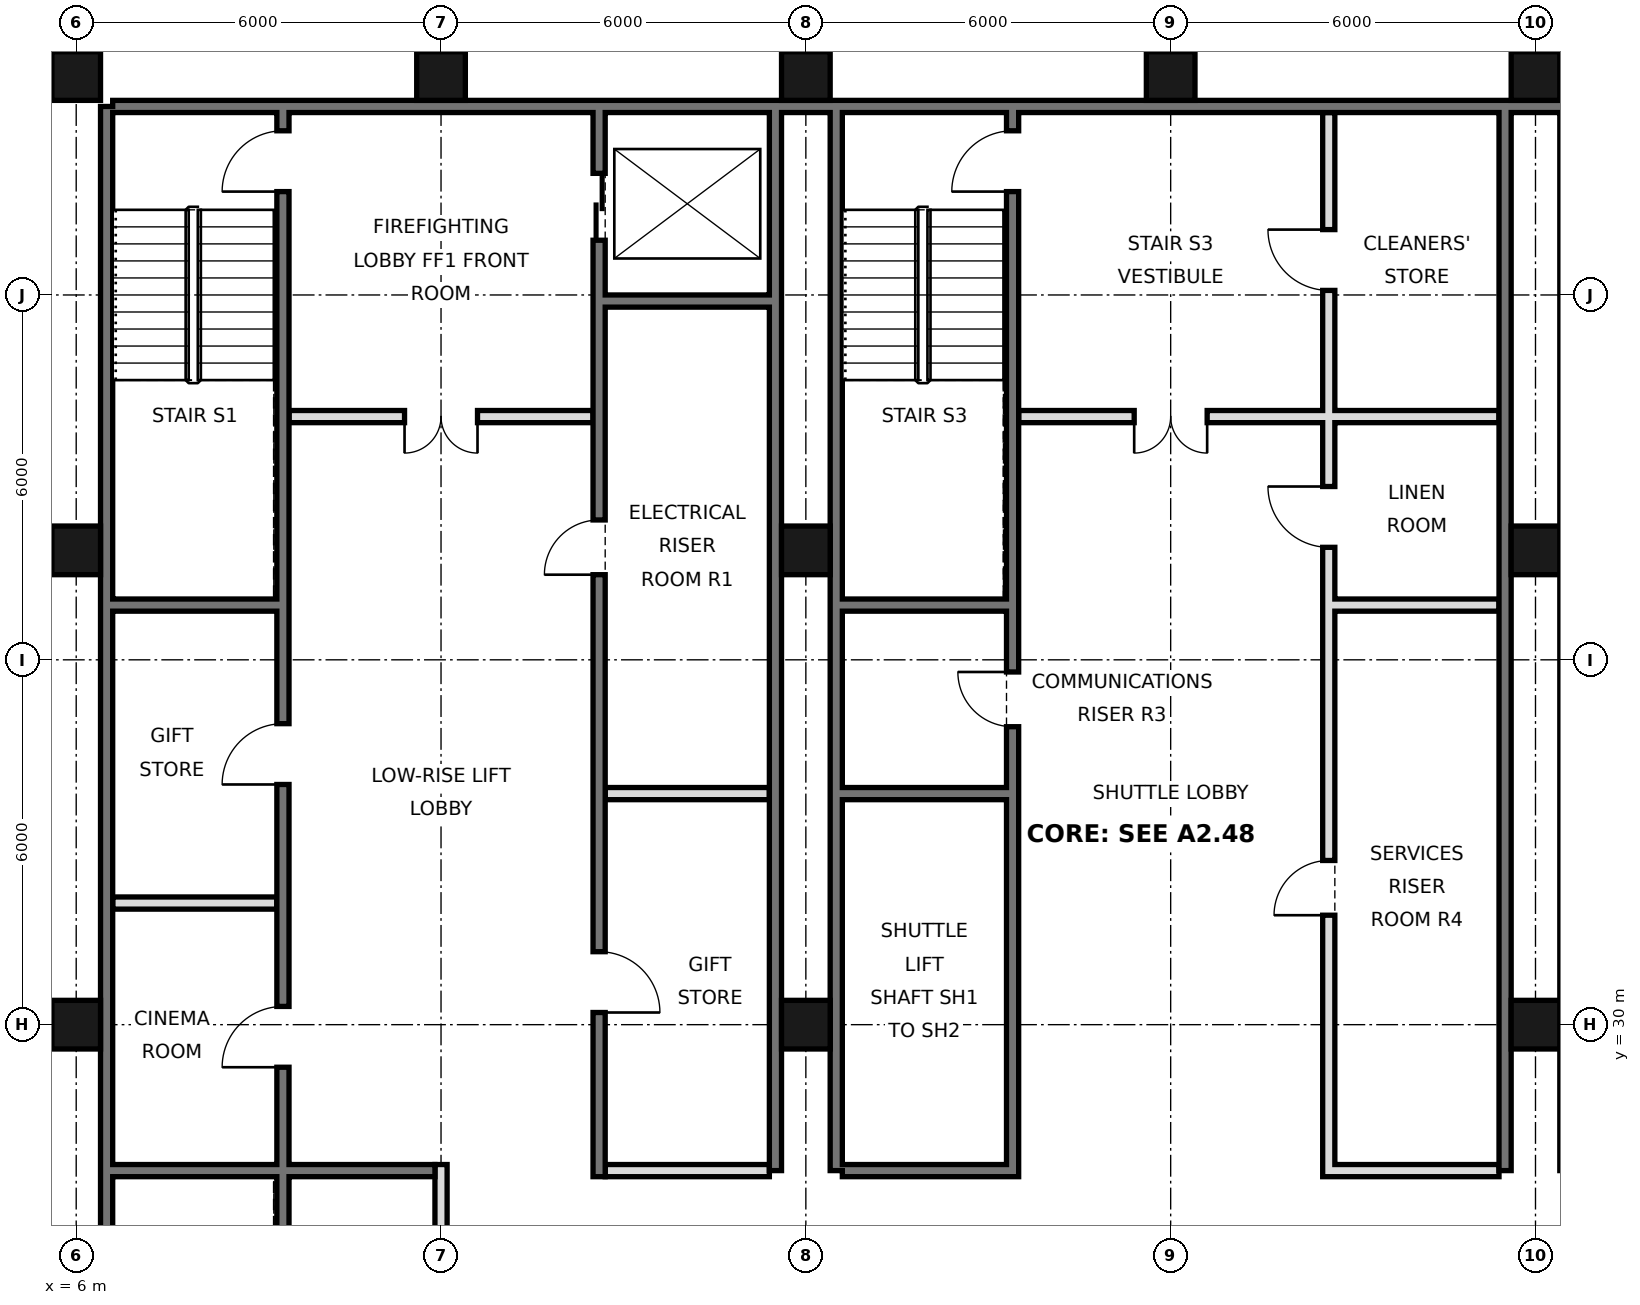
"""IFC4 building model, lengths in metres.
Left out: names, types, materials, properties, quantities, classifications, styles, units other than length and angle.
Written with IfcOpenShell. Run it as: python <this file> out.ifc"""

import sys

from ifc_helpers import new_model, si_unit, direction, frame, frame_2d, origin, origin_2d, place, context, subcontext, project, spatial, rectangle, hollow_rectangle, extrude, element, fill, save


model = new_model("IFC4")
c1 = context("Model", 3, precision=1e-05, world=origin(), true_north=direction((0.0, 1.0)))
c2 = subcontext(c1, "Body", "Model", "MODEL_VIEW")
j1 = project(units=[si_unit("LENGTHUNIT", "METRE"), si_unit("PLANEANGLEUNIT", "RADIAN")], contexts=[c1])
p1 = place(None, origin())
s1 = spatial("IfcSite", under=j1, at=p1, CompositionType="ELEMENT")
p2 = place(p1, origin())
s2 = spatial("IfcBuilding", under=s1, at=p2, CompositionType="ELEMENT")
p3 = place(p2, frame((0.0, 0.0, 192.0)))
s3 = spatial("IfcBuildingStorey", under=s2, at=p3, CompositionType="ELEMENT", Elevation=192.0)
for number, where, z_axis, x_axis in (
    (1, (6.0, 30.0, 0.0), (0.0, 0.0, 1.0), (1.0, 0.0, 0.0)),
    (2, (6.0, 37.8, 0.0), (0.0, 0.0, 1.0), (1.0, 0.0, 0.0)),
    (3, (6.0, 45.6, 0.0), (0.0, 0.0, 1.0), (1.0, 0.0, 0.0)),
    (4, (12.0, 45.6, 0.0), (0.0, 0.0, 1.0), (1.0, 0.0, 0.0)),
    (5, (18.0, 30.0, 0.0), (0.0, 0.0, 1.0), (1.0, 0.0, 0.0)),
    (6, (18.0, 37.8, 0.0), (0.0, 0.0, 1.0), (1.0, 0.0, 0.0)),
    (7, (18.0, 45.6, 0.0), (0.0, 0.0, 1.0), (1.0, 0.0, 0.0)),
    (8, (24.0, 45.6, 0.0), (0.0, 0.0, 1.0), (1.0, 0.0, 0.0)),
    (9, (30.0, 30.0, 0.0), (0.0, 0.0, 1.0), (1.0, 0.0, 0.0)),
    (10, (30.0, 37.8, 0.0), (0.0, 0.0, 1.0), (1.0, 0.0, 0.0)),
    (11, (30.0, 45.6, 0.0), (0.0, 0.0, 1.0), (1.0, 0.0, 0.0)),
):
    element("IfcColumn", number, at=place(p3, frame(where, z_axis=z_axis, x_axis=x_axis)), inside=s3, PredefinedType="COLUMN", context=c2, shape_type="SweptSolid", body=[
        extrude(hollow_rectangle(XDim=0.8, YDim=0.8, WallThickness=0.045, at=origin_2d()), origin(), (0.0, 0.0, 1.0), 3.6),
    ])
p4 = place(p3, frame((6.5, 21.6, 0.0), z_axis=(0.0, 0.0, 1.0), x_axis=(0.0, 1.0, 0.0)))
e12 = element("IfcWall", 12, at=p4, inside=s3, PredefinedType="SOLIDWALL", context=c2, shape_type="SweptSolid", body=[
    extrude(rectangle(XDim=23.5, YDim=0.2, at=frame_2d((11.75, 0.0))), origin(), (0.0, 0.0, 1.0), 3.42),
])
p5 = place(p3, frame((6.6, 45.1, 0.0), z_axis=(0.0, 0.0, 1.0), x_axis=(1.0, 0.0, 0.0)))
e13 = element("IfcWall", 13, at=p5, inside=s3, PredefinedType="SOLIDWALL", context=c2, shape_type="SweptSolid", body=[
    extrude(rectangle(XDim=34.8, YDim=0.2, at=frame_2d((17.4, 0.0))), origin(), (0.0, 0.0, 1.0), 3.42),
])
for number, where, z_axis, x_axis in (
    (14, (17.5, 27.6, 0.0), (0.0, 0.0, 1.0), (0.0, 1.0, 0.0)),
    (15, (18.5, 27.6, 0.0), (0.0, 0.0, 1.0), (0.0, 1.0, 0.0)),
    (16, (29.5, 27.6, 0.0), (0.0, 0.0, 1.0), (0.0, 1.0, 0.0)),
):
    element("IfcWall", number, at=place(p3, frame(where, z_axis=z_axis, x_axis=x_axis)), inside=s3, PredefinedType="SOLIDWALL", context=c2, shape_type="SweptSolid", body=[
        extrude(rectangle(XDim=17.5, YDim=0.2, at=frame_2d((8.75, 0.0))), origin(), (0.0, 0.0, 1.0), 3.42),
    ])
p6 = place(p3, frame((12.0, 21.6, 0.0), z_axis=(0.0, 0.0, 1.0), x_axis=(0.0, 1.0, 0.0)))
e17 = element("IfcWall", 17, at=p6, inside=s3, PredefinedType="PARTITIONING", context=c2, shape_type="SweptSolid", body=[
    extrude(rectangle(XDim=6.1, YDim=0.2, at=frame_2d((3.05, 0.0))), origin(), (0.0, 0.0, 1.0), 3.42),
])
p7 = place(p3, frame((14.6, 27.5, 0.0), z_axis=(0.0, 0.0, 1.0), x_axis=(0.0, 1.0, 0.0)))
e18 = element("IfcWall", 18, at=p7, inside=s3, PredefinedType="SOLIDWALL", context=c2, shape_type="SweptSolid", body=[
    extrude(rectangle(XDim=17.5, YDim=0.2, at=frame_2d((8.75, 0.0))), origin(), (0.0, 0.0, 1.0), 3.42),
])
p8 = place(p7, frame((15.4, 0.0, 0.0)))
e19 = element("IfcOpeningElement", 19, at=p8, cuts=e18, PredefinedType="OPENING", context=c2, shape_type="SweptSolid", body=[
    extrude(rectangle(XDim=1.1, YDim=2.1, at=frame_2d((0.55, 1.05))), frame((0.0, 0.11, 0.0), z_axis=(0.0, -1.0, 0.0), x_axis=(1.0, 0.0, 0.0)), (0.0, 0.0, 1.0), 0.22),
])
p9 = place(p7, frame((2.7, 0.0, 0.0)))
e20 = element("IfcOpeningElement", 20, at=p9, cuts=e18, PredefinedType="OPENING", context=c2, shape_type="SweptSolid", body=[
    extrude(rectangle(XDim=1.0, YDim=2.1, at=frame_2d((0.5, 1.05))), frame((0.0, 0.11, 0.0), z_axis=(0.0, -1.0, 0.0), x_axis=(1.0, 0.0, 0.0)), (0.0, 0.0, 1.0), 0.22),
])
p10 = place(p7, frame((9.9, 0.0, 0.0)))
e21 = element("IfcOpeningElement", 21, at=p10, cuts=e18, PredefinedType="OPENING", context=c2, shape_type="SweptSolid", body=[
    extrude(rectangle(XDim=0.9, YDim=2.1, at=frame_2d((0.45, 1.05))), frame((0.0, 0.11, 0.0), z_axis=(0.0, -1.0, 0.0), x_axis=(1.0, 0.0, 0.0)), (0.0, 0.0, 1.0), 0.22),
])
p11 = place(p3, frame((21.4, 27.5, 0.0), z_axis=(0.0, 0.0, 1.0), x_axis=(0.0, 1.0, 0.0)))
e22 = element("IfcWall", 22, at=p11, inside=s3, PredefinedType="SOLIDWALL", context=c2, shape_type="SweptSolid", body=[
    extrude(rectangle(XDim=17.5, YDim=0.2, at=frame_2d((8.75, 0.0))), origin(), (0.0, 0.0, 1.0), 3.42),
])
p12 = place(p11, frame((16.2, 0.0, 0.0)))
e23 = element("IfcOpeningElement", 23, at=p12, cuts=e22, PredefinedType="OPENING", context=c2, shape_type="SweptSolid", body=[
    extrude(rectangle(XDim=1.0, YDim=2.1, at=frame_2d((0.5, 1.05))), frame((0.0, 0.11, 0.0), z_axis=(0.0, -1.0, 0.0), x_axis=(1.0, 0.0, 0.0)), (0.0, 0.0, 1.0), 0.22),
])
p13 = place(p11, frame((7.4, 0.0, 0.0)))
e24 = element("IfcOpeningElement", 24, at=p13, cuts=e22, PredefinedType="OPENING", context=c2, shape_type="SweptSolid", body=[
    extrude(rectangle(XDim=0.9, YDim=2.1, at=frame_2d((0.45, 1.05))), frame((0.0, 0.11, 0.0), z_axis=(0.0, -1.0, 0.0), x_axis=(1.0, 0.0, 0.0)), (0.0, 0.0, 1.0), 0.22),
])
p14 = place(p3, frame((26.6, 27.5, 0.0), z_axis=(0.0, 0.0, 1.0), x_axis=(0.0, 1.0, 0.0)))
e25 = element("IfcWall", 25, at=p14, inside=s3, PredefinedType="SOLIDWALL", context=c2, shape_type="SweptSolid", body=[
    extrude(rectangle(XDim=17.5, YDim=0.2, at=frame_2d((8.75, 0.0))), origin(), (0.0, 0.0, 1.0), 3.42),
])
p15 = place(p14, frame((4.3, 0.0, 0.0)))
e26 = element("IfcOpeningElement", 26, at=p15, cuts=e25, PredefinedType="OPENING", context=c2, shape_type="SweptSolid", body=[
    extrude(rectangle(XDim=0.9, YDim=2.1, at=frame_2d((0.45, 1.05))), frame((0.0, 0.11, 0.0), z_axis=(0.0, -1.0, 0.0), x_axis=(1.0, 0.0, 0.0)), (0.0, 0.0, 1.0), 0.22),
])
p16 = place(p14, frame((10.35, 0.0, 0.0)))
e27 = element("IfcOpeningElement", 27, at=p16, cuts=e25, PredefinedType="OPENING", context=c2, shape_type="SweptSolid", body=[
    extrude(rectangle(XDim=1.0, YDim=2.1, at=frame_2d((0.5, 1.05))), frame((0.0, 0.11, 0.0), z_axis=(0.0, -1.0, 0.0), x_axis=(1.0, 0.0, 0.0)), (0.0, 0.0, 1.0), 0.22),
])
p17 = place(p14, frame((14.575, 0.0, 0.0)))
e28 = element("IfcOpeningElement", 28, at=p17, cuts=e25, PredefinedType="OPENING", context=c2, shape_type="SweptSolid", body=[
    extrude(rectangle(XDim=1.0, YDim=2.1, at=frame_2d((0.5, 1.05))), frame((0.0, 0.11, 0.0), z_axis=(0.0, -1.0, 0.0), x_axis=(1.0, 0.0, 0.0)), (0.0, 0.0, 1.0), 0.22),
])
p18 = place(p3, frame((9.4, 21.6, 0.0), z_axis=(0.0, 0.0, 1.0), x_axis=(0.0, 1.0, 0.0)))
e29 = element("IfcWall", 29, at=p18, inside=s3, PredefinedType="SOLIDWALL", context=c2, shape_type="SweptSolid", body=[
    extrude(rectangle(XDim=23.4, YDim=0.2, at=frame_2d((11.7, 0.0))), origin(), (0.0, 0.0, 1.0), 3.42),
])
p19 = place(p18, frame((7.7, 0.0, 0.0)))
e30 = element("IfcOpeningElement", 30, at=p19, cuts=e29, PredefinedType="OPENING", context=c2, shape_type="SweptSolid", body=[
    extrude(rectangle(XDim=1.0, YDim=2.1, at=frame_2d((0.5, 1.05))), frame((0.0, 0.11, 0.0), z_axis=(0.0, -1.0, 0.0), x_axis=(1.0, 0.0, 0.0)), (0.0, 0.0, 1.0), 0.22),
])
p20 = place(p18, frame((12.35, 0.0, 0.0)))
e31 = element("IfcOpeningElement", 31, at=p20, cuts=e29, PredefinedType="OPENING", context=c2, shape_type="SweptSolid", body=[
    extrude(rectangle(XDim=1.0, YDim=2.1, at=frame_2d((0.5, 1.05))), frame((0.0, 0.11, 0.0), z_axis=(0.0, -1.0, 0.0), x_axis=(1.0, 0.0, 0.0)), (0.0, 0.0, 1.0), 0.22),
])
p21 = place(p18, frame((22.1, 0.0, 0.0)))
e32 = element("IfcOpeningElement", 32, at=p21, cuts=e29, PredefinedType="OPENING", context=c2, shape_type="SweptSolid", body=[
    extrude(rectangle(XDim=1.0, YDim=2.1, at=frame_2d((0.5, 1.05))), frame((0.0, 0.11, 0.0), z_axis=(0.0, -1.0, 0.0), x_axis=(1.0, 0.0, 0.0)), (0.0, 0.0, 1.0), 0.22),
])
p22 = place(p18, frame((0.175, 0.0, 0.0)))
e33 = element("IfcOpeningElement", 33, at=p22, cuts=e29, PredefinedType="OPENING", context=c2, shape_type="SweptSolid", body=[
    extrude(rectangle(XDim=0.9, YDim=2.1, at=frame_2d((0.45, 1.05))), frame((0.0, 0.11, 0.0), z_axis=(0.0, -1.0, 0.0), x_axis=(1.0, 0.0, 0.0)), (0.0, 0.0, 1.0), 0.22),
])
p23 = place(p3, frame((14.7, 27.6, 0.0), z_axis=(0.0, 0.0, 1.0), x_axis=(1.0, 0.0, 0.0)))
e34 = element("IfcWall", 34, at=p23, inside=s3, PredefinedType="PARTITIONING", context=c2, shape_type="SweptSolid", body=[
    extrude(rectangle(XDim=2.7, YDim=0.2, at=frame_2d((1.35, 0.0))), origin(), (0.0, 0.0, 1.0), 3.42),
])
for number, where, z_axis, x_axis in (
    (35, (18.6, 27.6, 0.0), (0.0, 0.0, 1.0), (1.0, 0.0, 0.0)),
    (36, (26.7, 27.6, 0.0), (0.0, 0.0, 1.0), (1.0, 0.0, 0.0)),
):
    element("IfcWall", number, at=place(p3, frame(where, z_axis=z_axis, x_axis=x_axis)), inside=s3, PredefinedType="SOLIDWALL", context=c2, shape_type="SweptSolid", body=[
        extrude(rectangle(XDim=2.7, YDim=0.2, at=frame_2d((1.35, 0.0))), origin(), (0.0, 0.0, 1.0), 3.42),
    ])
p24 = place(p3, frame((6.6, 27.6, 0.0), z_axis=(0.0, 0.0, 1.0), x_axis=(1.0, 0.0, 0.0)))
e37 = element("IfcWall", 37, at=p24, inside=s3, PredefinedType="SOLIDWALL", context=c2, shape_type="SweptSolid", body=[
    extrude(rectangle(XDim=5.3, YDim=0.2, at=frame_2d((2.65, 0.0))), origin(), (0.0, 0.0, 1.0), 3.42),
])
p25 = place(p3, frame((6.6, 32.0, 0.0), z_axis=(0.0, 0.0, 1.0), x_axis=(1.0, 0.0, 0.0)))
e38 = element("IfcWall", 38, at=p25, inside=s3, PredefinedType="PARTITIONING", context=c2, shape_type="SweptSolid", body=[
    extrude(rectangle(XDim=2.7, YDim=0.2, at=frame_2d((1.35, 0.0))), origin(), (0.0, 0.0, 1.0), 3.42),
])
for number, where, z_axis, x_axis in (
    (39, (14.7, 33.8, 0.0), (0.0, 0.0, 1.0), (1.0, 0.0, 0.0)),
    (40, (18.6, 33.8, 0.0), (0.0, 0.0, 1.0), (1.0, 0.0, 0.0)),
    (41, (18.6, 36.9, 0.0), (0.0, 0.0, 1.0), (1.0, 0.0, 0.0)),
    (42, (26.7, 36.9, 0.0), (0.0, 0.0, 1.0), (1.0, 0.0, 0.0)),
    (43, (6.6, 36.9, 0.0), (0.0, 0.0, 1.0), (1.0, 0.0, 0.0)),
):
    element("IfcWall", number, at=place(p3, frame(where, z_axis=z_axis, x_axis=x_axis)), inside=s3, PredefinedType="SOLIDWALL", context=c2, shape_type="SweptSolid", body=[
        extrude(rectangle(XDim=2.7, YDim=0.2, at=frame_2d((1.35, 0.0))), origin(), (0.0, 0.0, 1.0), 3.42),
    ])
p26 = place(p3, frame((21.5, 40.0, 0.0), z_axis=(0.0, 0.0, 1.0), x_axis=(1.0, 0.0, 0.0)))
e44 = element("IfcWall", 44, at=p26, inside=s3, PredefinedType="PARTITIONING", context=c2, shape_type="SweptSolid", body=[
    extrude(rectangle(XDim=7.9, YDim=0.2, at=frame_2d((3.95, 0.0))), origin(), (0.0, 0.0, 1.0), 3.42),
])
p27 = place(p26, frame((1.9, 0.0, 0.0)))
e45 = element("IfcOpeningElement", 45, at=p27, cuts=e44, PredefinedType="OPENING", context=c2, shape_type="SweptSolid", body=[
    extrude(rectangle(XDim=1.2, YDim=2.1, at=frame_2d((0.6, 1.05))), frame((0.0, 0.11, 0.0), z_axis=(0.0, -1.0, 0.0), x_axis=(1.0, 0.0, 0.0)), (0.0, 0.0, 1.0), 0.22),
])
p28 = place(p3, frame((9.5, 40.0, 0.0), z_axis=(0.0, 0.0, 1.0), x_axis=(1.0, 0.0, 0.0)))
e46 = element("IfcWall", 46, at=p28, inside=s3, PredefinedType="PARTITIONING", context=c2, shape_type="SweptSolid", body=[
    extrude(rectangle(XDim=5.0, YDim=0.2, at=frame_2d((2.5, 0.0))), origin(), (0.0, 0.0, 1.0), 3.42),
])
p29 = place(p28, frame((1.9, 0.0, 0.0)))
e47 = element("IfcOpeningElement", 47, at=p29, cuts=e46, PredefinedType="OPENING", context=c2, shape_type="SweptSolid", body=[
    extrude(rectangle(XDim=1.2, YDim=2.1, at=frame_2d((0.6, 1.05))), frame((0.0, 0.11, 0.0), z_axis=(0.0, -1.0, 0.0), x_axis=(1.0, 0.0, 0.0)), (0.0, 0.0, 1.0), 0.22),
])
p30 = place(p3, frame((14.7, 41.9, 0.0), z_axis=(0.0, 0.0, 1.0), x_axis=(1.0, 0.0, 0.0)))
e48 = element("IfcWall", 48, at=p30, inside=s3, PredefinedType="SOLIDWALL", context=c2, shape_type="SweptSolid", body=[
    extrude(rectangle(XDim=2.7, YDim=0.2, at=frame_2d((1.35, 0.0))), origin(), (0.0, 0.0, 1.0), 3.42),
])
p31 = place(p29, frame((1.2, 0.0, 0.0), z_axis=(0.0, 0.0, 1.0), x_axis=(-1.0, 0.0, 0.0)))
e49 = element("IfcDoor", 49, at=p31, inside=s3, OperationType="DOUBLE_DOOR_SINGLE_SWING", PredefinedType="DOOR", context=c2, shape_type="SweptSolid", body=[
    extrude(rectangle(XDim=1.2, YDim=2.1, at=frame_2d((0.6, 1.05))), frame((0.0, 0.025, 0.0), z_axis=(0.0, -1.0, 0.0), x_axis=(1.0, 0.0, 0.0)), (0.0, 0.0, 1.0), 0.05),
])
fill(e47, e49)
p32 = place(p27, frame((1.2, 0.0, 0.0), z_axis=(0.0, 0.0, 1.0), x_axis=(-1.0, 0.0, 0.0)))
e50 = element("IfcDoor", 50, at=p32, inside=s3, OperationType="DOUBLE_DOOR_SINGLE_SWING", PredefinedType="DOOR", context=c2, shape_type="SweptSolid", body=[
    extrude(rectangle(XDim=1.2, YDim=2.1, at=frame_2d((0.6, 1.05))), frame((0.0, 0.025, 0.0), z_axis=(0.0, -1.0, 0.0), x_axis=(1.0, 0.0, 0.0)), (0.0, 0.0, 1.0), 0.05),
])
fill(e45, e50)
p33 = place(p8, origin())
e51 = element("IfcDoor", 51, at=p33, inside=s3, OperationType="DOUBLE_DOOR_SLIDING", PredefinedType="DOOR", context=c2, shape_type="SweptSolid", body=[
    extrude(rectangle(XDim=1.1, YDim=2.1, at=frame_2d((0.55, 1.05))), frame((0.0, 0.025, 0.0), z_axis=(0.0, -1.0, 0.0), x_axis=(1.0, 0.0, 0.0)), (0.0, 0.0, 1.0), 0.05),
])
fill(e19, e51)
p34 = place(p9, frame((1.0, 0.0, 0.0), z_axis=(0.0, 0.0, 1.0), x_axis=(-1.0, 0.0, 0.0)))
e52 = element("IfcDoor", 52, at=p34, inside=s3, OperationType="SINGLE_SWING_RIGHT", PredefinedType="DOOR", context=c2, shape_type="SweptSolid", body=[
    extrude(rectangle(XDim=1.0, YDim=2.1, at=frame_2d((0.5, 1.05))), frame((0.0, 0.025, 0.0), z_axis=(0.0, -1.0, 0.0), x_axis=(1.0, 0.0, 0.0)), (0.0, 0.0, 1.0), 0.05),
])
fill(e20, e52)
p35 = place(p19, origin())
e53 = element("IfcDoor", 53, at=p35, inside=s3, OperationType="SINGLE_SWING_LEFT", PredefinedType="DOOR", context=c2, shape_type="SweptSolid", body=[
    extrude(rectangle(XDim=1.0, YDim=2.1, at=frame_2d((0.5, 1.05))), frame((0.0, 0.025, 0.0), z_axis=(0.0, -1.0, 0.0), x_axis=(1.0, 0.0, 0.0)), (0.0, 0.0, 1.0), 0.05),
])
fill(e30, e53)
p36 = place(p20, origin())
e54 = element("IfcDoor", 54, at=p36, inside=s3, OperationType="SINGLE_SWING_LEFT", PredefinedType="DOOR", context=c2, shape_type="SweptSolid", body=[
    extrude(rectangle(XDim=1.0, YDim=2.1, at=frame_2d((0.5, 1.05))), frame((0.0, 0.025, 0.0), z_axis=(0.0, -1.0, 0.0), x_axis=(1.0, 0.0, 0.0)), (0.0, 0.0, 1.0), 0.05),
])
fill(e31, e54)
p37 = place(p21, origin())
e55 = element("IfcDoor", 55, at=p37, inside=s3, OperationType="SINGLE_SWING_LEFT", PredefinedType="DOOR", context=c2, shape_type="SweptSolid", body=[
    extrude(rectangle(XDim=1.0, YDim=2.1, at=frame_2d((0.5, 1.05))), frame((0.0, 0.025, 0.0), z_axis=(0.0, -1.0, 0.0), x_axis=(1.0, 0.0, 0.0)), (0.0, 0.0, 1.0), 0.05),
])
fill(e32, e55)
p38 = place(p12, origin())
e56 = element("IfcDoor", 56, at=p38, inside=s3, OperationType="SINGLE_SWING_LEFT", PredefinedType="DOOR", context=c2, shape_type="SweptSolid", body=[
    extrude(rectangle(XDim=1.0, YDim=2.1, at=frame_2d((0.5, 1.05))), frame((0.0, 0.025, 0.0), z_axis=(0.0, -1.0, 0.0), x_axis=(1.0, 0.0, 0.0)), (0.0, 0.0, 1.0), 0.05),
])
fill(e23, e56)
p39 = place(p10, origin())
e57 = element("IfcDoor", 57, at=p39, inside=s3, OperationType="SINGLE_SWING_LEFT", PredefinedType="DOOR", context=c2, shape_type="SweptSolid", body=[
    extrude(rectangle(XDim=0.9, YDim=2.1, at=frame_2d((0.45, 1.05))), frame((0.0, 0.025, 0.0), z_axis=(0.0, -1.0, 0.0), x_axis=(1.0, 0.0, 0.0)), (0.0, 0.0, 1.0), 0.05),
])
fill(e21, e57)
p40 = place(p13, frame((0.9, 0.0, 0.0), z_axis=(0.0, 0.0, 1.0), x_axis=(-1.0, 0.0, 0.0)))
e58 = element("IfcDoor", 58, at=p40, inside=s3, OperationType="SINGLE_SWING_LEFT", PredefinedType="DOOR", context=c2, shape_type="SweptSolid", body=[
    extrude(rectangle(XDim=0.9, YDim=2.1, at=frame_2d((0.45, 1.05))), frame((0.0, 0.025, 0.0), z_axis=(0.0, -1.0, 0.0), x_axis=(1.0, 0.0, 0.0)), (0.0, 0.0, 1.0), 0.05),
])
fill(e24, e58)
p41 = place(p15, origin())
e59 = element("IfcDoor", 59, at=p41, inside=s3, OperationType="SINGLE_SWING_LEFT", PredefinedType="DOOR", context=c2, shape_type="SweptSolid", body=[
    extrude(rectangle(XDim=0.9, YDim=2.1, at=frame_2d((0.45, 1.05))), frame((0.0, 0.025, 0.0), z_axis=(0.0, -1.0, 0.0), x_axis=(1.0, 0.0, 0.0)), (0.0, 0.0, 1.0), 0.05),
])
fill(e26, e59)
p42 = place(p16, frame((1.0, 0.0, 0.0), z_axis=(0.0, 0.0, 1.0), x_axis=(-1.0, 0.0, 0.0)))
e60 = element("IfcDoor", 60, at=p42, inside=s3, OperationType="SINGLE_SWING_LEFT", PredefinedType="DOOR", context=c2, shape_type="SweptSolid", body=[
    extrude(rectangle(XDim=1.0, YDim=2.1, at=frame_2d((0.5, 1.05))), frame((0.0, 0.025, 0.0), z_axis=(0.0, -1.0, 0.0), x_axis=(1.0, 0.0, 0.0)), (0.0, 0.0, 1.0), 0.05),
])
fill(e27, e60)
p43 = place(p17, frame((1.0, 0.0, 0.0), z_axis=(0.0, 0.0, 1.0), x_axis=(-1.0, 0.0, 0.0)))
e61 = element("IfcDoor", 61, at=p43, inside=s3, OperationType="SINGLE_SWING_LEFT", PredefinedType="DOOR", context=c2, shape_type="SweptSolid", body=[
    extrude(rectangle(XDim=1.0, YDim=2.1, at=frame_2d((0.5, 1.05))), frame((0.0, 0.025, 0.0), z_axis=(0.0, -1.0, 0.0), x_axis=(1.0, 0.0, 0.0)), (0.0, 0.0, 1.0), 0.05),
])
fill(e28, e61)
save(model, sys.argv[1])
